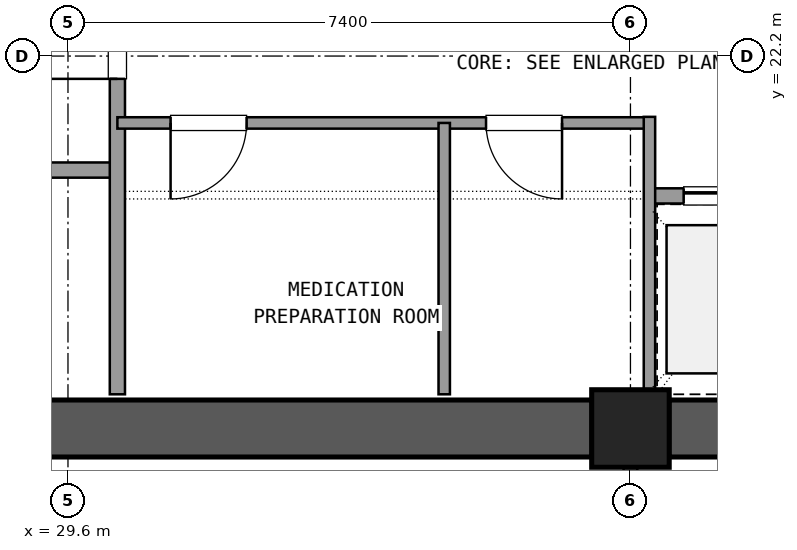
"""IFC4 building model, lengths in metres.
Left out: names, types, materials, properties, quantities, classifications, styles, units other than length and angle.
Written with IfcOpenShell. Run it as: python <this file> out.ifc"""

import sys

from ifc_helpers import new_model, si_unit, direction, frame, frame_2d, origin, origin_2d, place, context, subcontext, project, spatial, rectangle, extrude, element, fill, save


model = new_model("IFC4")
c1 = context("Model", 3, precision=1e-05, world=origin(), true_north=direction((0.0, 1.0)))
c2 = subcontext(c1, "Body", "Model", "MODEL_VIEW")
j1 = project(units=[si_unit("LENGTHUNIT", "METRE"), si_unit("PLANEANGLEUNIT", "RADIAN")], contexts=[c1])
p1 = place(None, origin())
s1 = spatial("IfcSite", under=j1, at=p1, CompositionType="ELEMENT")
p2 = place(p1, origin())
s2 = spatial("IfcBuilding", under=s1, at=p2, CompositionType="ELEMENT")
p3 = place(p2, frame((0.0, 0.0, 170.82)))
s3 = spatial("IfcBuildingStorey", under=s2, at=p3, CompositionType="ELEMENT", Elevation=170.82)
p4 = place(p3, frame((37.0, 17.3, 0.0), z_axis=(0.0, 0.0, 1.0), x_axis=(1.0, 0.0, 0.0)))
e1 = element("IfcColumn", 1, at=p4, inside=s3, PredefinedType="COLUMN", context=c2, shape_type="SweptSolid", body=[
    extrude(rectangle(XDim=1.02, YDim=1.02, at=origin_2d()), origin(), (0.0, 0.0, 1.0), 3.6),
])
for number, where, z_axis, x_axis in (
    (2, (26.305, 17.3, 0.0), (0.0, 0.0, 1.0), (1.0, 0.0, 0.0)),
    (3, (37.505, 17.3, 0.0), (0.0, 0.0, 1.0), (1.0, 0.0, 0.0)),
):
    element("IfcWall", number, at=place(p3, frame(where, z_axis=z_axis, x_axis=x_axis)), inside=s3, PredefinedType="SHEAR", context=c2, shape_type="SweptSolid", body=[
        extrude(rectangle(XDim=10.19, YDim=0.75, at=frame_2d((5.095, 0.0))), origin(), (0.0, 0.0, 1.0), 3.32),
    ])
p5 = place(p3, frame((26.25, 20.7, 0.0), z_axis=(0.0, 0.0, 1.0), x_axis=(1.0, 0.0, 0.0)))
e4 = element("IfcWall", 4, at=p5, inside=s3, PredefinedType="SOLIDWALL", context=c2, shape_type="SweptSolid", body=[
    extrude(rectangle(XDim=4.0, YDim=0.2, at=frame_2d((2.0, 0.0))), origin(), (0.0, 0.0, 1.0), 2.61),
])
p6 = place(p5, frame((0.65, 0.0, 0.0)))
e5 = element("IfcOpeningElement", 5, at=p6, cuts=e4, PredefinedType="OPENING", context=c2, shape_type="SweptSolid", body=[
    extrude(rectangle(XDim=1.2, YDim=2.15, at=frame_2d((0.6, 1.075))), frame((0.0, 0.11, 0.0), z_axis=(0.0, -1.0, 0.0), x_axis=(1.0, 0.0, 0.0)), (0.0, 0.0, 1.0), 0.22),
])
p7 = place(p3, frame((30.25, 17.75, 0.0), z_axis=(0.0, 0.0, 1.0), x_axis=(0.0, 1.0, 0.0)))
e6 = element("IfcWall", 6, at=p7, inside=s3, PredefinedType="SOLIDWALL", context=c2, shape_type="SweptSolid", body=[
    extrude(rectangle(XDim=6.9, YDim=0.2, at=frame_2d((3.45, 0.0))), origin(), (0.0, 0.0, 1.0), 2.61),
])
p8 = place(p7, frame((4.15, 0.0, 0.0)))
e7 = element("IfcOpeningElement", 7, at=p8, cuts=e6, PredefinedType="OPENING", context=c2, shape_type="SweptSolid", body=[
    extrude(rectangle(XDim=1.2, YDim=2.15, at=frame_2d((0.6, 1.075))), frame((0.0, 0.11, 0.0), z_axis=(0.0, -1.0, 0.0), x_axis=(1.0, 0.0, 0.0)), (0.0, 0.0, 1.0), 0.22),
])
p9 = place(p3, frame((30.25, 21.32, 0.0), z_axis=(0.0, 0.0, 1.0), x_axis=(1.0, 0.0, 0.0)))
e8 = element("IfcWall", 8, at=p9, inside=s3, PredefinedType="PARTITIONING", context=c2, shape_type="SweptSolid", body=[
    extrude(rectangle(XDim=7.0, YDim=0.15, at=frame_2d((3.5, 0.0))), origin(), (0.0, 0.0, 1.0), 2.61),
])
p10 = place(p9, frame((0.7, 0.0, 0.0)))
e9 = element("IfcOpeningElement", 9, at=p10, cuts=e8, PredefinedType="OPENING", context=c2, shape_type="SweptSolid", body=[
    extrude(rectangle(XDim=1.0, YDim=2.15, at=frame_2d((0.5, 1.075))), frame((0.0, 0.085, 0.0), z_axis=(0.0, -1.0, 0.0), x_axis=(1.0, 0.0, 0.0)), (0.0, 0.0, 1.0), 0.17),
])
p11 = place(p9, frame((4.85, 0.0, 0.0)))
e10 = element("IfcOpeningElement", 10, at=p11, cuts=e8, PredefinedType="OPENING", context=c2, shape_type="SweptSolid", body=[
    extrude(rectangle(XDim=1.0, YDim=2.15, at=frame_2d((0.5, 1.075))), frame((0.0, 0.085, 0.0), z_axis=(0.0, -1.0, 0.0), x_axis=(1.0, 0.0, 0.0)), (0.0, 0.0, 1.0), 0.17),
])
p12 = place(p3, frame((34.55, 17.75, 0.0), z_axis=(0.0, 0.0, 1.0), x_axis=(0.0, 1.0, 0.0)))
e11 = element("IfcWall", 11, at=p12, inside=s3, PredefinedType="PARTITIONING", context=c2, shape_type="SweptSolid", body=[
    extrude(rectangle(XDim=3.57, YDim=0.15, at=frame_2d((1.785, 0.0))), origin(), (0.0, 0.0, 1.0), 2.61),
])
p13 = place(p3, frame((37.25, 20.36, 0.0), z_axis=(0.0, 0.0, 1.0), x_axis=(1.0, 0.0, 0.0)))
e12 = element("IfcWall", 12, at=p13, inside=s3, PredefinedType="SOLIDWALL", context=c2, shape_type="SweptSolid", body=[
    extrude(rectangle(XDim=6.1, YDim=0.2, at=frame_2d((3.05, 0.0))), origin(), (0.0, 0.0, 1.0), 2.61),
])
p14 = place(p13, frame((0.45, 0.0, 0.0)))
e13 = element("IfcOpeningElement", 13, at=p14, cuts=e12, PredefinedType="OPENING", context=c2, shape_type="SweptSolid", body=[
    extrude(rectangle(XDim=1.1, YDim=2.15, at=frame_2d((0.55, 1.075))), frame((0.0, 0.11, 0.0), z_axis=(0.0, -1.0, 0.0), x_axis=(1.0, 0.0, 0.0)), (0.0, 0.0, 1.0), 0.22),
])
p15 = place(p13, frame((2.5, 0.0, 0.0)))
e14 = element("IfcOpeningElement", 14, at=p15, cuts=e12, PredefinedType="OPENING", context=c2, shape_type="SweptSolid", body=[
    extrude(rectangle(XDim=1.1, YDim=2.15, at=frame_2d((0.55, 1.075))), frame((0.0, 0.11, 0.0), z_axis=(0.0, -1.0, 0.0), x_axis=(1.0, 0.0, 0.0)), (0.0, 0.0, 1.0), 0.22),
])
p16 = place(p13, frame((4.55, 0.0, 0.0)))
e15 = element("IfcOpeningElement", 15, at=p16, cuts=e12, PredefinedType="OPENING", context=c2, shape_type="SweptSolid", body=[
    extrude(rectangle(XDim=1.1, YDim=2.15, at=frame_2d((0.55, 1.075))), frame((0.0, 0.11, 0.0), z_axis=(0.0, -1.0, 0.0), x_axis=(1.0, 0.0, 0.0)), (0.0, 0.0, 1.0), 0.22),
])
p17 = place(p3, frame((37.25, 17.75, 0.0), z_axis=(0.0, 0.0, 1.0), x_axis=(0.0, 1.0, 0.0)))
e16 = element("IfcWall", 16, at=p17, inside=s3, PredefinedType="PARTITIONING", context=c2, shape_type="SweptSolid", body=[
    extrude(rectangle(XDim=3.65, YDim=0.15, at=frame_2d((1.825, 0.0))), origin(), (0.0, 0.0, 1.0), 2.61),
])
p18 = place(p3, frame((37.0, 13.64, 0.0), z_axis=(0.0, 0.0, 1.0), x_axis=(0.0, 1.0, 0.0)))
e17 = element("IfcWall", 17, at=p18, inside=s3, PredefinedType="PARTITIONING", context=c2, shape_type="SweptSolid", body=[
    extrude(rectangle(XDim=3.21, YDim=0.18, at=frame_2d((1.605, 0.0))), origin(), (0.0, 0.0, 1.0), 2.61),
])
p19 = place(p18, frame((0.605, 0.0, 0.0)))
e18 = element("IfcOpeningElement", 18, at=p19, cuts=e17, PredefinedType="OPENING", context=c2, shape_type="SweptSolid", body=[
    extrude(rectangle(XDim=2.0, YDim=2.2, at=frame_2d((1.0, 1.1))), frame((0.0, 0.1, 0.0), z_axis=(0.0, -1.0, 0.0), x_axis=(1.0, 0.0, 0.0)), (0.0, 0.0, 1.0), 0.2),
])
p20 = place(p8, origin())
e19 = element("IfcDoor", 19, at=p20, inside=s3, OperationType="SINGLE_SWING_LEFT", PredefinedType="DOOR", context=c2, shape_type="SweptSolid", body=[
    extrude(rectangle(XDim=1.2, YDim=2.15, at=frame_2d((0.6, 1.075))), frame((0.0, 0.025, 0.0), z_axis=(0.0, -1.0, 0.0), x_axis=(1.0, 0.0, 0.0)), (0.0, 0.0, 1.0), 0.05),
])
fill(e7, e19)
p21 = place(p10, frame((1.0, 0.0, 0.0), z_axis=(0.0, 0.0, 1.0), x_axis=(-1.0, 0.0, 0.0)))
e20 = element("IfcDoor", 20, at=p21, inside=s3, OperationType="SINGLE_SWING_LEFT", PredefinedType="DOOR", context=c2, shape_type="SweptSolid", body=[
    extrude(rectangle(XDim=1.0, YDim=2.15, at=frame_2d((0.5, 1.075))), frame((0.0, 0.025, 0.0), z_axis=(0.0, -1.0, 0.0), x_axis=(1.0, 0.0, 0.0)), (0.0, 0.0, 1.0), 0.05),
])
fill(e9, e20)
p22 = place(p11, frame((1.0, 0.0, 0.0), z_axis=(0.0, 0.0, 1.0), x_axis=(-1.0, 0.0, 0.0)))
e21 = element("IfcDoor", 21, at=p22, inside=s3, OperationType="SINGLE_SWING_RIGHT", PredefinedType="DOOR", context=c2, shape_type="SweptSolid", body=[
    extrude(rectangle(XDim=1.0, YDim=2.15, at=frame_2d((0.5, 1.075))), frame((0.0, 0.025, 0.0), z_axis=(0.0, -1.0, 0.0), x_axis=(1.0, 0.0, 0.0)), (0.0, 0.0, 1.0), 0.05),
])
fill(e10, e21)
p23 = place(p14, origin())
e22 = element("IfcDoor", 22, at=p23, inside=s3, OperationType="SLIDING_TO_LEFT", PredefinedType="DOOR", context=c2, shape_type="SweptSolid", body=[
    extrude(rectangle(XDim=1.1, YDim=2.15, at=frame_2d((0.55, 1.075))), frame((0.0, 0.025, 0.0), z_axis=(0.0, -1.0, 0.0), x_axis=(1.0, 0.0, 0.0)), (0.0, 0.0, 1.0), 0.05),
])
fill(e13, e22)
save(model, sys.argv[1])
